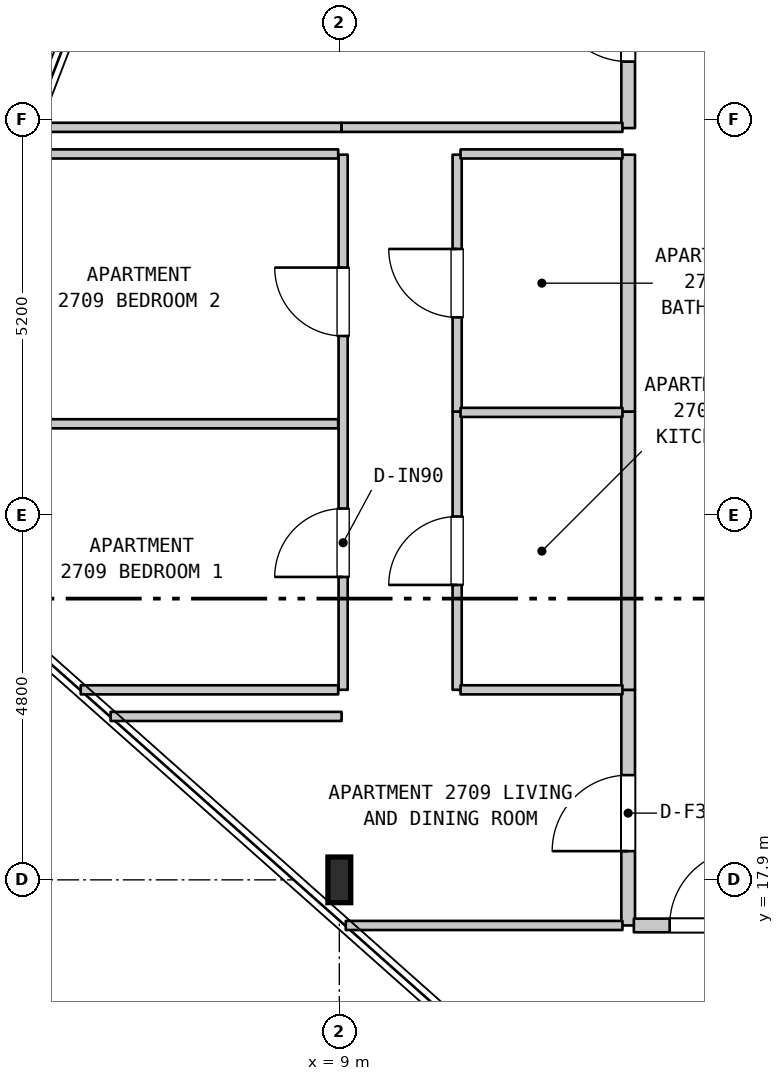
"""IFC4 building model, lengths in metres.
Left out: names, types, materials, properties, quantities, classifications, styles, units other than length and angle.
Written with IfcOpenShell. Run it as: python <this file> out.ifc"""

import sys

from ifc_helpers import new_model, si_unit, direction, frame, frame_2d, origin, origin_2d, place, context, subcontext, project, spatial, rectangle, i_section, extrude, element, fill, save


model = new_model("IFC4")
c1 = context("Model", 3, precision=1e-05, world=origin(), true_north=direction((0.0, 1.0)))
c2 = subcontext(c1, "Body", "Model", "MODEL_VIEW")
j1 = project(units=[si_unit("LENGTHUNIT", "METRE"), si_unit("PLANEANGLEUNIT", "RADIAN")], contexts=[c1])
p1 = place(None, origin())
s1 = spatial("IfcSite", under=j1, at=p1, CompositionType="ELEMENT")
p2 = place(p1, origin())
s2 = spatial("IfcBuilding", under=s1, at=p2, CompositionType="ELEMENT")
p3 = place(p2, frame((0.0, 0.0, 113.1)))
s3 = spatial("IfcBuildingStorey", under=s2, at=p3, CompositionType="ELEMENT", Elevation=113.1)
p4 = place(p3, frame((9.0, 17.9, 0.0), z_axis=(0.0, 0.0, 1.0), x_axis=(1.0, 0.0, 0.0)))
e1 = element("IfcColumn", 1, at=p4, inside=s3, PredefinedType="COLUMN", context=c2, shape_type="SweptSolid", body=[
    extrude(i_section(OverallWidth=0.3, OverallDepth=0.6, WebThickness=0.015, FlangeThickness=0.03, FilletRadius=0.027, at=origin_2d()), origin(), (0.0, 0.0, 1.0), 3.7),
])
p5 = place(p3, frame((9.05, 20.4, 0.0), z_axis=(0.0, 0.0, 1.0), x_axis=(0.0, 1.0, 0.0)))
e2 = element("IfcWall", 2, at=p5, inside=s3, PredefinedType="PARTITIONING", context=c2, shape_type="SweptSolid", body=[
    extrude(rectangle(XDim=7.04, YDim=0.12, at=frame_2d((3.52, 0.0))), origin(), (0.0, 0.0, 1.0), 2.785),
])
p6 = place(p5, frame((1.485, 0.0, 0.0)))
e3 = element("IfcOpeningElement", 3, at=p6, cuts=e2, PredefinedType="OPENING", context=c2, shape_type="SweptSolid", body=[
    extrude(rectangle(XDim=0.9, YDim=2.15, at=frame_2d((0.45, 1.075))), frame((0.0, 0.07, 0.0), z_axis=(0.0, -1.0, 0.0), x_axis=(1.0, 0.0, 0.0)), (0.0, 0.0, 1.0), 0.14),
])
p7 = place(p5, frame((4.655, 0.0, 0.0)))
e4 = element("IfcOpeningElement", 4, at=p7, cuts=e2, PredefinedType="OPENING", context=c2, shape_type="SweptSolid", body=[
    extrude(rectangle(XDim=0.9, YDim=2.15, at=frame_2d((0.45, 1.075))), frame((0.0, 0.07, 0.0), z_axis=(0.0, -1.0, 0.0), x_axis=(1.0, 0.0, 0.0)), (0.0, 0.0, 1.0), 0.14),
])
p8 = place(p3, frame((10.55, 20.4, 0.0), z_axis=(0.0, 0.0, 1.0), x_axis=(0.0, 1.0, 0.0)))
e5 = element("IfcWall", 5, at=p8, inside=s3, PredefinedType="PARTITIONING", context=c2, shape_type="SweptSolid", body=[
    extrude(rectangle(XDim=3.661, YDim=0.12, at=frame_2d((1.831, 0.0))), origin(), (0.0, 0.0, 1.0), 3.385),
])
p9 = place(p8, frame((1.38, 0.0, 0.0)))
e6 = element("IfcOpeningElement", 6, at=p9, cuts=e5, PredefinedType="OPENING", context=c2, shape_type="SweptSolid", body=[
    extrude(rectangle(XDim=0.9, YDim=2.15, at=frame_2d((0.45, 1.075))), frame((0.0, 0.07, 0.0), z_axis=(0.0, -1.0, 0.0), x_axis=(1.0, 0.0, 0.0)), (0.0, 0.0, 1.0), 0.14),
])
p10 = place(p3, frame((10.55, 24.061, 0.0), z_axis=(0.0, 0.0, 1.0), x_axis=(0.0, 1.0, 0.0)))
e7 = element("IfcWall", 7, at=p10, inside=s3, PredefinedType="PARTITIONING", context=c2, shape_type="SweptSolid", body=[
    extrude(rectangle(XDim=3.379, YDim=0.12, at=frame_2d((1.689, 0.0))), origin(), (0.0, 0.0, 1.0), 3.385),
])
p11 = place(p10, frame((1.239, 0.0, 0.0)))
e8 = element("IfcOpeningElement", 8, at=p11, cuts=e7, PredefinedType="OPENING", context=c2, shape_type="SweptSolid", body=[
    extrude(rectangle(XDim=0.9, YDim=2.1, at=frame_2d((0.45, 1.05))), frame((0.0, 0.07, 0.0), z_axis=(0.0, -1.0, 0.0), x_axis=(1.0, 0.0, 0.0)), (0.0, 0.0, 1.0), 0.14),
])
p12 = place(p3, frame((12.8, 17.3, 0.0), z_axis=(0.0, 0.0, 1.0), x_axis=(0.0, 1.0, 0.0)))
e9 = element("IfcWall", 9, at=p12, inside=s3, PredefinedType="STANDARD", context=c2, shape_type="SweptSolid", body=[
    extrude(rectangle(XDim=3.1, YDim=0.18, at=frame_2d((1.55, 0.0))), origin(), (0.0, 0.0, 1.0), 3.385),
])
p13 = place(p12, frame((0.978, 0.0, 0.0)))
e10 = element("IfcOpeningElement", 10, at=p13, cuts=e9, PredefinedType="OPENING", context=c2, shape_type="SweptSolid", body=[
    extrude(rectangle(XDim=1.0, YDim=2.15, at=frame_2d((0.5, 1.075))), frame((0.0, 0.1, 0.0), z_axis=(0.0, -1.0, 0.0), x_axis=(1.0, 0.0, 0.0)), (0.0, 0.0, 1.0), 0.2),
])
p14 = place(p3, frame((12.8, 20.4, 0.0), z_axis=(0.0, 0.0, 1.0), x_axis=(0.0, 1.0, 0.0)))
e11 = element("IfcWall", 11, at=p14, inside=s3, PredefinedType="STANDARD", context=c2, shape_type="SweptSolid", body=[
    extrude(rectangle(XDim=3.661, YDim=0.18, at=frame_2d((1.831, 0.0))), origin(), (0.0, 0.0, 1.0), 3.385),
])
p15 = place(p3, frame((12.8, 24.061, 0.0), z_axis=(0.0, 0.0, 1.0), x_axis=(0.0, 1.0, 0.0)))
e12 = element("IfcWall", 12, at=p15, inside=s3, PredefinedType="STANDARD", context=c2, shape_type="SweptSolid", body=[
    extrude(rectangle(XDim=3.379, YDim=0.18, at=frame_2d((1.689, 0.0))), origin(), (0.0, 0.0, 1.0), 3.385),
])
p16 = place(p3, frame((12.8, 27.79, 0.0), z_axis=(0.0, 0.0, 1.0), x_axis=(0.0, 1.0, 0.0)))
e13 = element("IfcWall", 13, at=p16, inside=s3, PredefinedType="STANDARD", context=c2, shape_type="SweptSolid", body=[
    extrude(rectangle(XDim=2.75, YDim=0.18, at=frame_2d((1.375, 0.0))), origin(), (0.0, 0.0, 1.0), 3.385),
])
p17 = place(p16, frame((0.875, 0.0, 0.0)))
e14 = element("IfcOpeningElement", 14, at=p17, cuts=e13, PredefinedType="OPENING", context=c2, shape_type="SweptSolid", body=[
    extrude(rectangle(XDim=1.0, YDim=2.15, at=frame_2d((0.5, 1.075))), frame((0.0, 0.1, 0.0), z_axis=(0.0, -1.0, 0.0), x_axis=(1.0, 0.0, 0.0)), (0.0, 0.0, 1.0), 0.2),
])
p18 = place(p3, frame((9.085, 17.3, 0.0), z_axis=(0.0, 0.0, 1.0), x_axis=(1.0, 0.0, 0.0)))
e15 = element("IfcWall", 15, at=p18, inside=s3, PredefinedType="PARTITIONING", context=c2, shape_type="SweptSolid", body=[
    extrude(rectangle(XDim=3.64, YDim=0.12, at=frame_2d((1.82, 0.0))), origin(), (0.0, 0.0, 1.0), 3.385),
])
p19 = place(p3, frame((12.875, 17.3, 0.0), z_axis=(0.0, 0.0, 1.0), x_axis=(1.0, 0.0, 0.0)))
e16 = element("IfcWall", 16, at=p19, inside=s3, PredefinedType="STANDARD", context=c2, shape_type="SweptSolid", body=[
    extrude(rectangle(XDim=3.28, YDim=0.18, at=frame_2d((1.64, 0.0))), origin(), (0.0, 0.0, 1.0), 3.385),
])
p20 = place(p19, frame((0.471, 0.0, 0.0)))
e17 = element("IfcOpeningElement", 17, at=p20, cuts=e16, PredefinedType="OPENING", context=c2, shape_type="SweptSolid", body=[
    extrude(rectangle(XDim=1.0, YDim=2.15, at=frame_2d((0.5, 1.075))), frame((0.0, 0.1, 0.0), z_axis=(0.0, -1.0, 0.0), x_axis=(1.0, 0.0, 0.0)), (0.0, 0.0, 1.0), 0.2),
])
p21 = place(p3, frame((5.991, 20.05, 0.0), z_axis=(0.0, 0.0, 1.0), x_axis=(1.0, 0.0, 0.0)))
e18 = element("IfcWall", 18, at=p21, inside=s3, PredefinedType="PARTITIONING", context=c2, shape_type="SweptSolid", body=[
    extrude(rectangle(XDim=3.039, YDim=0.12, at=frame_2d((1.52, 0.0))), origin(), (0.0, 0.0, 1.0), 3.385),
])
p22 = place(p3, frame((5.598, 20.4, 0.0), z_axis=(0.0, 0.0, 1.0), x_axis=(1.0, 0.0, 0.0)))
e19 = element("IfcWall", 19, at=p22, inside=s3, PredefinedType="PARTITIONING", context=c2, shape_type="SweptSolid", body=[
    extrude(rectangle(XDim=3.387, YDim=0.12, at=frame_2d((1.694, 0.0))), origin(), (0.0, 0.0, 1.0), 3.385),
])
p23 = place(p3, frame((10.595, 20.4, 0.0), z_axis=(0.0, 0.0, 1.0), x_axis=(1.0, 0.0, 0.0)))
e20 = element("IfcWall", 20, at=p23, inside=s3, PredefinedType="PARTITIONING", context=c2, shape_type="SweptSolid", body=[
    extrude(rectangle(XDim=2.13, YDim=0.12, at=frame_2d((1.065, 0.0))), origin(), (0.0, 0.0, 1.0), 3.385),
])
p24 = place(p3, frame((3.501, 23.9, 0.0), z_axis=(0.0, 0.0, 1.0), x_axis=(1.0, 0.0, 0.0)))
e21 = element("IfcWall", 21, at=p24, inside=s3, PredefinedType="PARTITIONING", context=c2, shape_type="SweptSolid", body=[
    extrude(rectangle(XDim=5.484, YDim=0.12, at=frame_2d((2.742, 0.0))), origin(), (0.0, 0.0, 1.0), 3.385),
])
p25 = place(p3, frame((10.595, 24.05, 0.0), z_axis=(0.0, 0.0, 1.0), x_axis=(1.0, 0.0, 0.0)))
e22 = element("IfcWall", 22, at=p25, inside=s3, PredefinedType="PARTITIONING", context=c2, shape_type="SweptSolid", body=[
    extrude(rectangle(XDim=2.13, YDim=0.12, at=frame_2d((1.065, 0.0))), origin(), (0.0, 0.0, 1.0), 3.385),
])
p26 = place(p3, frame((4.837, 27.45, 0.0), z_axis=(0.0, 0.0, 1.0), x_axis=(1.0, 0.0, 0.0)))
e23 = element("IfcWall", 23, at=p26, inside=s3, PredefinedType="PARTITIONING", context=c2, shape_type="SweptSolid", body=[
    extrude(rectangle(XDim=4.148, YDim=0.12, at=frame_2d((2.074, 0.0))), origin(), (0.0, 0.0, 1.0), 3.385),
])
p27 = place(p3, frame((10.595, 27.45, 0.0), z_axis=(0.0, 0.0, 1.0), x_axis=(1.0, 0.0, 0.0)))
e24 = element("IfcWall", 24, at=p27, inside=s3, PredefinedType="PARTITIONING", context=c2, shape_type="SweptSolid", body=[
    extrude(rectangle(XDim=2.13, YDim=0.12, at=frame_2d((1.065, 0.0))), origin(), (0.0, 0.0, 1.0), 3.385),
])
p28 = place(p3, frame((4.971, 27.8, 0.0), z_axis=(0.0, 0.0, 1.0), x_axis=(1.0, 0.0, 0.0)))
e25 = element("IfcWall", 25, at=p28, inside=s3, PredefinedType="PARTITIONING", context=c2, shape_type="SweptSolid", body=[
    extrude(rectangle(XDim=4.059, YDim=0.12, at=frame_2d((2.03, 0.0))), origin(), (0.0, 0.0, 1.0), 3.385),
])
p29 = place(p3, frame((9.03, 27.8, 0.0), z_axis=(0.0, 0.0, 1.0), x_axis=(1.0, 0.0, 0.0)))
e26 = element("IfcWall", 26, at=p29, inside=s3, PredefinedType="PARTITIONING", context=c2, shape_type="SweptSolid", body=[
    extrude(rectangle(XDim=3.695, YDim=0.12, at=frame_2d((1.848, 0.0))), origin(), (0.0, 0.0, 1.0), 3.385),
])
p30 = place(p6, origin())
e27 = element("IfcDoor", 27, at=p30, inside=s3, OperationType="SINGLE_SWING_LEFT", PredefinedType="DOOR", context=c2, shape_type="SweptSolid", body=[
    extrude(rectangle(XDim=0.9, YDim=2.15, at=frame_2d((0.45, 1.075))), frame((0.0, 0.025, 0.0), z_axis=(0.0, -1.0, 0.0), x_axis=(1.0, 0.0, 0.0)), (0.0, 0.0, 1.0), 0.05),
])
fill(e3, e27)
p31 = place(p7, origin())
e28 = element("IfcDoor", 28, at=p31, inside=s3, OperationType="SINGLE_SWING_RIGHT", PredefinedType="DOOR", context=c2, shape_type="SweptSolid", body=[
    extrude(rectangle(XDim=0.9, YDim=2.15, at=frame_2d((0.45, 1.075))), frame((0.0, 0.025, 0.0), z_axis=(0.0, -1.0, 0.0), x_axis=(1.0, 0.0, 0.0)), (0.0, 0.0, 1.0), 0.05),
])
fill(e4, e28)
p32 = place(p9, origin())
e29 = element("IfcDoor", 29, at=p32, inside=s3, OperationType="SINGLE_SWING_LEFT", PredefinedType="DOOR", context=c2, shape_type="SweptSolid", body=[
    extrude(rectangle(XDim=0.9, YDim=2.15, at=frame_2d((0.45, 1.075))), frame((0.0, 0.025, 0.0), z_axis=(0.0, -1.0, 0.0), x_axis=(1.0, 0.0, 0.0)), (0.0, 0.0, 1.0), 0.05),
])
fill(e6, e29)
p33 = place(p11, origin())
e30 = element("IfcDoor", 30, at=p33, inside=s3, OperationType="SINGLE_SWING_RIGHT", PredefinedType="DOOR", context=c2, shape_type="SweptSolid", body=[
    extrude(rectangle(XDim=0.9, YDim=2.1, at=frame_2d((0.45, 1.05))), frame((0.0, 0.025, 0.0), z_axis=(0.0, -1.0, 0.0), x_axis=(1.0, 0.0, 0.0)), (0.0, 0.0, 1.0), 0.05),
])
fill(e8, e30)
p34 = place(p13, origin())
e31 = element("IfcDoor", 31, at=p34, inside=s3, OperationType="SINGLE_SWING_LEFT", PredefinedType="DOOR", context=c2, shape_type="SweptSolid", body=[
    extrude(rectangle(XDim=1.0, YDim=2.15, at=frame_2d((0.5, 1.075))), frame((0.0, 0.025, 0.0), z_axis=(0.0, -1.0, 0.0), x_axis=(1.0, 0.0, 0.0)), (0.0, 0.0, 1.0), 0.05),
])
fill(e10, e31)
p35 = place(p17, origin())
e32 = element("IfcDoor", 32, at=p35, inside=s3, OperationType="SINGLE_SWING_RIGHT", PredefinedType="DOOR", context=c2, shape_type="SweptSolid", body=[
    extrude(rectangle(XDim=1.0, YDim=2.15, at=frame_2d((0.5, 1.075))), frame((0.0, 0.025, 0.0), z_axis=(0.0, -1.0, 0.0), x_axis=(1.0, 0.0, 0.0)), (0.0, 0.0, 1.0), 0.05),
])
fill(e14, e32)
p36 = place(p20, origin())
e33 = element("IfcDoor", 33, at=p36, inside=s3, OperationType="SINGLE_SWING_RIGHT", PredefinedType="DOOR", context=c2, shape_type="SweptSolid", body=[
    extrude(rectangle(XDim=1.0, YDim=2.15, at=frame_2d((0.5, 1.075))), frame((0.0, 0.025, 0.0), z_axis=(0.0, -1.0, 0.0), x_axis=(1.0, 0.0, 0.0)), (0.0, 0.0, 1.0), 0.05),
])
fill(e17, e33)
save(model, sys.argv[1])
